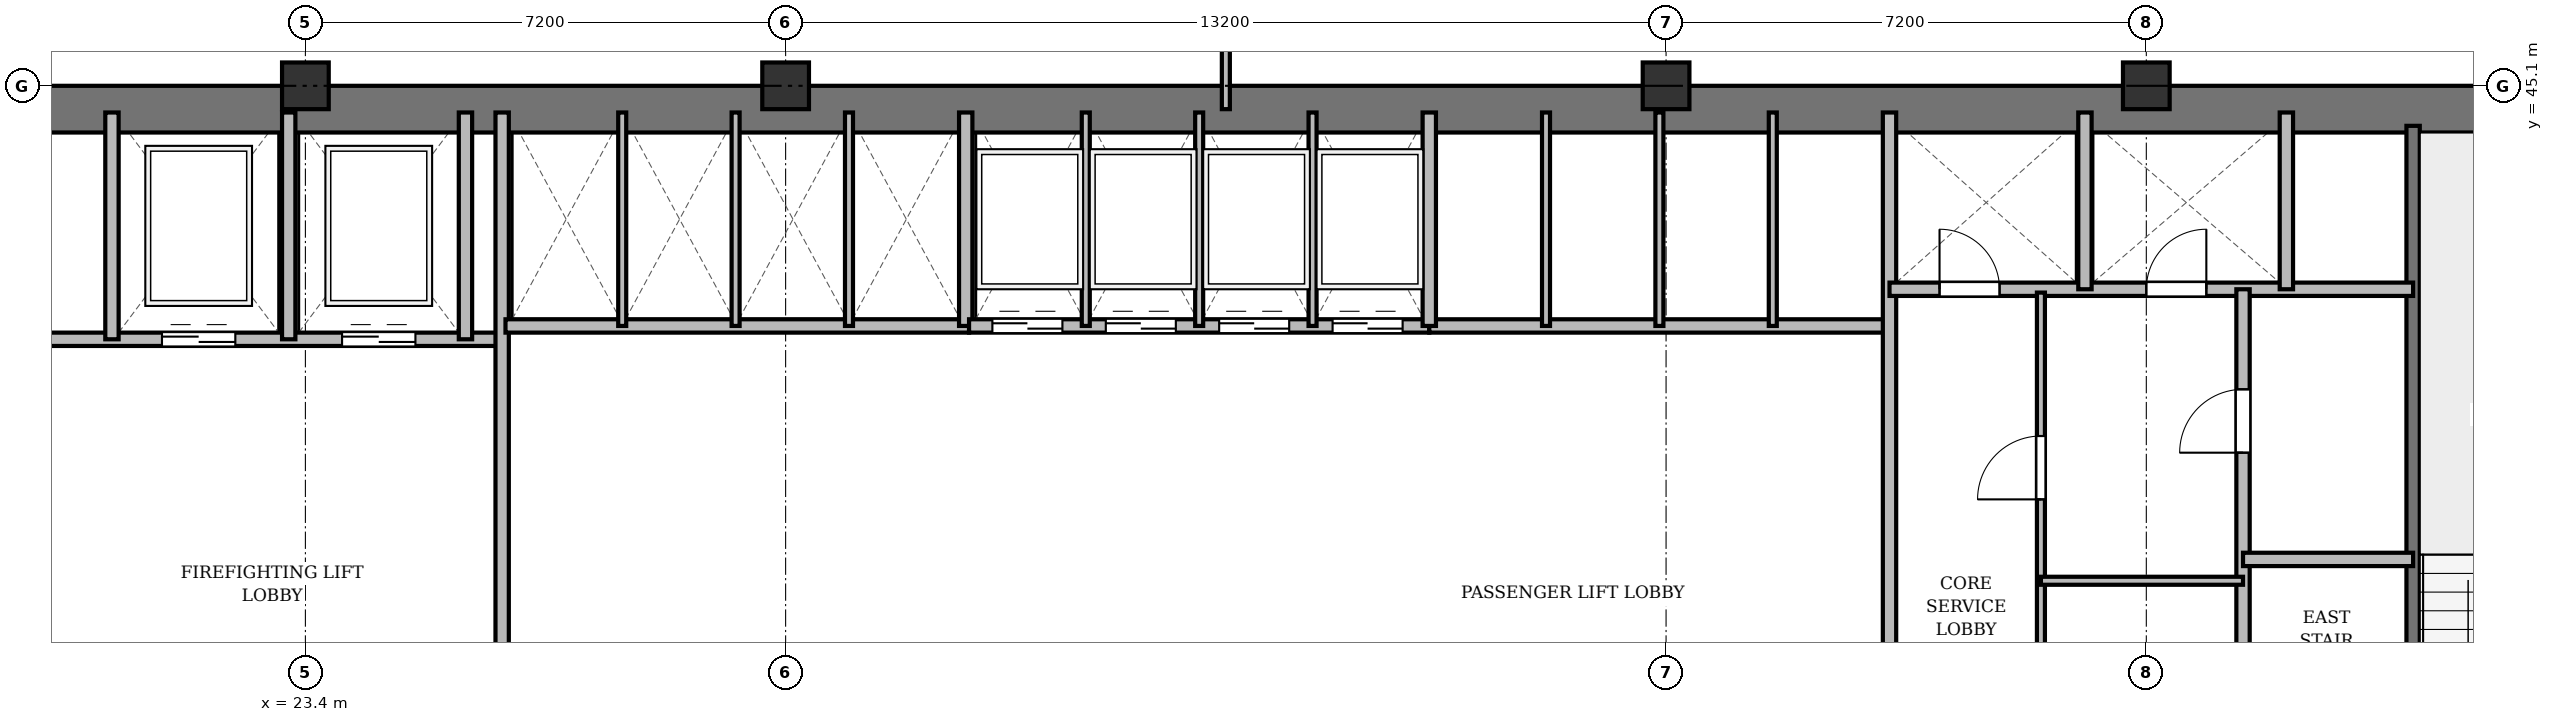
"""IFC4 building model, lengths in metres.
Left out: names, types, materials, properties, quantities, classifications, styles, units other than length and angle.
Written with IfcOpenShell. Run it as: python <this file> out.ifc"""

import sys

from ifc_helpers import new_model, si_unit, direction, frame, frame_2d, origin, origin_2d, place, context, subcontext, project, spatial, rectangle, extrude, source, transform, mapped, element, fill, save


model = new_model("IFC4")
c1 = context("Model", 3, precision=1e-05, world=origin(), true_north=direction((0.0, 1.0)))
c2 = subcontext(c1, "Body", "Model", "MODEL_VIEW")
j1 = project(units=[si_unit("LENGTHUNIT", "METRE"), si_unit("PLANEANGLEUNIT", "RADIAN")], contexts=[c1])
p1 = place(None, origin())
s1 = spatial("IfcSite", under=j1, at=p1, CompositionType="ELEMENT")
p2 = place(p1, origin())
s2 = spatial("IfcBuilding", under=s1, at=p2, CompositionType="ELEMENT")
p3 = place(p2, frame((0.0, 0.0, 132.1)))
s3 = spatial("IfcBuildingStorey", under=s2, at=p3, CompositionType="ELEMENT", Elevation=132.1)
m1 = source(origin(), c2, "Body", "SweptSolid", [
    extrude(rectangle(XDim=0.7, YDim=0.7, at=origin_2d()), origin(), (0.0, 0.0, 1.0), 3.6),
])
for number, where, z_axis, x_axis in (
    (1, (23.4, 45.1, 0.0), (0.0, 0.0, 1.0), (1.0, 0.0, 0.0)),
    (2, (30.6, 45.1, 0.0), (0.0, 0.0, 1.0), (1.0, 0.0, 0.0)),
    (3, (43.8, 45.1, 0.0), (0.0, 0.0, 1.0), (1.0, 0.0, 0.0)),
    (4, (51.0, 45.1, 0.0), (0.0, 0.0, 1.0), (1.0, 0.0, 0.0)),
):
    element("IfcColumn", number, at=place(p3, frame(where, z_axis=z_axis, x_axis=x_axis)), inside=s3, PredefinedType="COLUMN", context=c2, shape_type="MappedRepresentation", body=[
        mapped(m1, transform((0.0, 0.0, 0.0), x_axis=(1.0, 0.0, 0.0), y_axis=(0.0, 1.0, 0.0), z_axis=(0.0, 0.0, 1.0), scale=1.0)),
    ])
p4 = place(p3, frame((15.5, 44.75, 0.0), z_axis=(0.0, 0.0, 1.0), x_axis=(1.0, 0.0, 0.0)))
e5 = element("IfcWall", 5, at=p4, inside=s3, PredefinedType="SHEAR", context=c2, shape_type="SweptSolid", body=[
    extrude(rectangle(XDim=43.4, YDim=0.7, at=frame_2d((21.7, 0.0))), origin(), (0.0, 0.0, 1.0), 3.35),
])
p5 = place(p3, frame((55.0, 33.4, 0.0), z_axis=(0.0, 0.0, 1.0), x_axis=(0.0, 1.0, 0.0)))
e6 = element("IfcWall", 6, at=p5, inside=s3, PredefinedType="SHEAR", context=c2, shape_type="SweptSolid", body=[
    extrude(rectangle(XDim=11.1, YDim=0.2, at=frame_2d((5.55, 0.0))), origin(), (0.0, 0.0, 1.0), 3.35),
])
p6 = place(p5, frame((0.85, 0.0, 0.0)))
e7 = element("IfcOpeningElement", 7, at=p6, cuts=e6, PredefinedType="OPENING", context=c2, shape_type="SweptSolid", body=[
    extrude(rectangle(XDim=1.1, YDim=2.15, at=frame_2d((0.55, 1.075))), frame((0.0, 0.11, 0.0), z_axis=(0.0, -1.0, 0.0), x_axis=(1.0, 0.0, 0.0)), (0.0, 0.0, 1.0), 0.22),
])
p7 = place(p3, frame((19.55, 41.3, 0.0), z_axis=(0.0, 0.0, 1.0), x_axis=(1.0, 0.0, 0.0)))
e8 = element("IfcWall", 8, at=p7, inside=s3, PredefinedType="SOLIDWALL", context=c2, shape_type="SweptSolid", body=[
    extrude(rectangle(XDim=6.75, YDim=0.2, at=frame_2d((3.375, 0.0))), origin(), (0.0, 0.0, 1.0), 3.35),
])
p8 = place(p7, frame((1.7, 0.0, 0.0)))
e9 = element("IfcOpeningElement", 9, at=p8, cuts=e8, PredefinedType="OPENING", context=c2, shape_type="SweptSolid", body=[
    extrude(rectangle(XDim=1.1, YDim=2.15, at=frame_2d((0.55, 1.075))), frame((0.0, 0.11, 0.0), z_axis=(0.0, -1.0, 0.0), x_axis=(1.0, 0.0, 0.0)), (0.0, 0.0, 1.0), 0.22),
])
p9 = place(p7, frame((4.4, 0.0, 0.0)))
e10 = element("IfcOpeningElement", 10, at=p9, cuts=e8, PredefinedType="OPENING", context=c2, shape_type="SweptSolid", body=[
    extrude(rectangle(XDim=1.1, YDim=2.15, at=frame_2d((0.55, 1.075))), frame((0.0, 0.11, 0.0), z_axis=(0.0, -1.0, 0.0), x_axis=(1.0, 0.0, 0.0)), (0.0, 0.0, 1.0), 0.22),
])
for number, where, z_axis, x_axis in (
    (11, (20.5, 41.3, 0.0), (0.0, 0.0, 1.0), (0.0, 1.0, 0.0)),
    (12, (23.15, 41.3, 0.0), (0.0, 0.0, 1.0), (0.0, 1.0, 0.0)),
    (13, (25.8, 41.3, 0.0), (0.0, 0.0, 1.0), (0.0, 1.0, 0.0)),
):
    element("IfcWall", number, at=place(p3, frame(where, z_axis=z_axis, x_axis=x_axis)), inside=s3, PredefinedType="SOLIDWALL", context=c2, shape_type="SweptSolid", body=[
        extrude(rectangle(XDim=3.4, YDim=0.2, at=frame_2d((1.7, 0.0))), origin(), (0.0, 0.0, 1.0), 3.35),
    ])
p10 = place(p3, frame((26.35, 33.4, 0.0), z_axis=(0.0, 0.0, 1.0), x_axis=(0.0, 1.0, 0.0)))
e14 = element("IfcWall", 14, at=p10, inside=s3, PredefinedType="SOLIDWALL", context=c2, shape_type="SweptSolid", body=[
    extrude(rectangle(XDim=11.3, YDim=0.2, at=frame_2d((5.65, 0.0))), origin(), (0.0, 0.0, 1.0), 2.75),
])
p11 = place(p3, frame((26.4, 41.5, 0.0), z_axis=(0.0, 0.0, 1.0), x_axis=(1.0, 0.0, 0.0)))
e15 = element("IfcWall", 15, at=p11, inside=s3, PredefinedType="SOLIDWALL", context=c2, shape_type="SweptSolid", body=[
    extrude(rectangle(XDim=6.95, YDim=0.2, at=frame_2d((3.475, 0.0))), origin(), (0.0, 0.0, 1.0), 2.85),
])
p12 = place(p3, frame((33.3, 41.5, 0.0), z_axis=(0.0, 0.0, 1.0), x_axis=(0.0, 1.0, 0.0)))
e16 = element("IfcWall", 16, at=p12, inside=s3, PredefinedType="SOLIDWALL", context=c2, shape_type="SweptSolid", body=[
    extrude(rectangle(XDim=3.2, YDim=0.2, at=frame_2d((1.6, 0.0))), origin(), (0.0, 0.0, 1.0), 3.35),
])
for number, where, z_axis, x_axis in (
    (17, (28.15, 41.5, 0.0), (0.0, 0.0, 1.0), (0.0, 1.0, 0.0)),
    (18, (29.85, 41.5, 0.0), (0.0, 0.0, 1.0), (0.0, 1.0, 0.0)),
    (19, (31.55, 41.5, 0.0), (0.0, 0.0, 1.0), (0.0, 1.0, 0.0)),
):
    element("IfcWall", number, at=place(p3, frame(where, z_axis=z_axis, x_axis=x_axis)), inside=s3, PredefinedType="PARTITIONING", context=c2, shape_type="SweptSolid", body=[
        extrude(rectangle(XDim=3.2, YDim=0.12, at=frame_2d((1.6, 0.0))), origin(), (0.0, 0.0, 1.0), 3.35),
    ])
p13 = place(p3, frame((33.35, 41.5, 0.0), z_axis=(0.0, 0.0, 1.0), x_axis=(1.0, 0.0, 0.0)))
e20 = element("IfcWall", 20, at=p13, inside=s3, PredefinedType="SOLIDWALL", context=c2, shape_type="SweptSolid", body=[
    extrude(rectangle(XDim=6.9, YDim=0.2, at=frame_2d((3.45, 0.0))), origin(), (0.0, 0.0, 1.0), 3.35),
])
p14 = place(p13, frame((0.35, 0.0, 0.0)))
e21 = element("IfcOpeningElement", 21, at=p14, cuts=e20, PredefinedType="OPENING", context=c2, shape_type="SweptSolid", body=[
    extrude(rectangle(XDim=1.05, YDim=2.15, at=frame_2d((0.525, 1.075))), frame((0.0, 0.11, 0.0), z_axis=(0.0, -1.0, 0.0), x_axis=(1.0, 0.0, 0.0)), (0.0, 0.0, 1.0), 0.22),
])
p15 = place(p13, frame((2.05, 0.0, 0.0)))
e22 = element("IfcOpeningElement", 22, at=p15, cuts=e20, PredefinedType="OPENING", context=c2, shape_type="SweptSolid", body=[
    extrude(rectangle(XDim=1.05, YDim=2.15, at=frame_2d((0.525, 1.075))), frame((0.0, 0.11, 0.0), z_axis=(0.0, -1.0, 0.0), x_axis=(1.0, 0.0, 0.0)), (0.0, 0.0, 1.0), 0.22),
])
p16 = place(p13, frame((3.75, 0.0, 0.0)))
e23 = element("IfcOpeningElement", 23, at=p16, cuts=e20, PredefinedType="OPENING", context=c2, shape_type="SweptSolid", body=[
    extrude(rectangle(XDim=1.05, YDim=2.15, at=frame_2d((0.525, 1.075))), frame((0.0, 0.11, 0.0), z_axis=(0.0, -1.0, 0.0), x_axis=(1.0, 0.0, 0.0)), (0.0, 0.0, 1.0), 0.22),
])
p17 = place(p13, frame((5.45, 0.0, 0.0)))
e24 = element("IfcOpeningElement", 24, at=p17, cuts=e20, PredefinedType="OPENING", context=c2, shape_type="SweptSolid", body=[
    extrude(rectangle(XDim=1.05, YDim=2.15, at=frame_2d((0.525, 1.075))), frame((0.0, 0.11, 0.0), z_axis=(0.0, -1.0, 0.0), x_axis=(1.0, 0.0, 0.0)), (0.0, 0.0, 1.0), 0.22),
])
for number, where, z_axis, x_axis in (
    (25, (35.1, 41.5, 0.0), (0.0, 0.0, 1.0), (0.0, 1.0, 0.0)),
    (26, (36.8, 41.5, 0.0), (0.0, 0.0, 1.0), (0.0, 1.0, 0.0)),
    (27, (38.5, 41.5, 0.0), (0.0, 0.0, 1.0), (0.0, 1.0, 0.0)),
):
    element("IfcWall", number, at=place(p3, frame(where, z_axis=z_axis, x_axis=x_axis)), inside=s3, PredefinedType="PARTITIONING", context=c2, shape_type="SweptSolid", body=[
        extrude(rectangle(XDim=3.2, YDim=0.12, at=frame_2d((1.6, 0.0))), origin(), (0.0, 0.0, 1.0), 3.35),
    ])
p18 = place(p3, frame((40.25, 41.5, 0.0), z_axis=(0.0, 0.0, 1.0), x_axis=(1.0, 0.0, 0.0)))
e28 = element("IfcWall", 28, at=p18, inside=s3, PredefinedType="SOLIDWALL", context=c2, shape_type="SweptSolid", body=[
    extrude(rectangle(XDim=6.9, YDim=0.2, at=frame_2d((3.45, 0.0))), origin(), (0.0, 0.0, 1.0), 2.85),
])
p19 = place(p3, frame((40.25, 41.5, 0.0), z_axis=(0.0, 0.0, 1.0), x_axis=(0.0, 1.0, 0.0)))
e29 = element("IfcWall", 29, at=p19, inside=s3, PredefinedType="SOLIDWALL", context=c2, shape_type="SweptSolid", body=[
    extrude(rectangle(XDim=3.2, YDim=0.2, at=frame_2d((1.6, 0.0))), origin(), (0.0, 0.0, 1.0), 3.35),
])
p20 = place(p3, frame((42.0, 41.5, 0.0), z_axis=(0.0, 0.0, 1.0), x_axis=(0.0, 1.0, 0.0)))
e30 = element("IfcWall", 30, at=p20, inside=s3, PredefinedType="PARTITIONING", context=c2, shape_type="SweptSolid", body=[
    extrude(rectangle(XDim=3.2, YDim=0.12, at=frame_2d((1.6, 0.0))), origin(), (0.0, 0.0, 1.0), 3.35),
])
p21 = place(p3, frame((43.7, 41.5, 0.0), z_axis=(0.0, 0.0, 1.0), x_axis=(0.0, 1.0, 0.0)))
e31 = element("IfcWall", 31, at=p21, inside=s3, PredefinedType="PARTITIONING", context=c2, shape_type="SweptSolid", body=[
    extrude(rectangle(XDim=3.2, YDim=0.12, at=frame_2d((1.6, 0.0))), origin(), (0.0, 0.0, 1.0), 2.85),
])
p22 = place(p3, frame((45.4, 41.5, 0.0), z_axis=(0.0, 0.0, 1.0), x_axis=(0.0, 1.0, 0.0)))
e32 = element("IfcWall", 32, at=p22, inside=s3, PredefinedType="PARTITIONING", context=c2, shape_type="SweptSolid", body=[
    extrude(rectangle(XDim=3.2, YDim=0.12, at=frame_2d((1.6, 0.0))), origin(), (0.0, 0.0, 1.0), 3.35),
])
p23 = place(p3, frame((47.15, 33.4, 0.0), z_axis=(0.0, 0.0, 1.0), x_axis=(0.0, 1.0, 0.0)))
e33 = element("IfcWall", 33, at=p23, inside=s3, PredefinedType="SOLIDWALL", context=c2, shape_type="SweptSolid", body=[
    extrude(rectangle(XDim=11.3, YDim=0.2, at=frame_2d((5.65, 0.0))), origin(), (0.0, 0.0, 1.0), 2.75),
])
p24 = place(p3, frame((47.15, 42.05, 0.0), z_axis=(0.0, 0.0, 1.0), x_axis=(1.0, 0.0, 0.0)))
e34 = element("IfcWall", 34, at=p24, inside=s3, PredefinedType="SOLIDWALL", context=c2, shape_type="SweptSolid", body=[
    extrude(rectangle(XDim=7.85, YDim=0.2, at=frame_2d((3.925, 0.0))), origin(), (0.0, 0.0, 1.0), 2.85),
])
p25 = place(p24, frame((0.75, 0.0, 0.0)))
e35 = element("IfcOpeningElement", 35, at=p25, cuts=e34, PredefinedType="OPENING", context=c2, shape_type="SweptSolid", body=[
    extrude(rectangle(XDim=0.9, YDim=2.1, at=frame_2d((0.45, 1.05))), frame((0.0, 0.11, 0.0), z_axis=(0.0, -1.0, 0.0), x_axis=(1.0, 0.0, 0.0)), (0.0, 0.0, 1.0), 0.22),
])
p26 = place(p24, frame((3.85, 0.0, 0.0)))
e36 = element("IfcOpeningElement", 36, at=p26, cuts=e34, PredefinedType="OPENING", context=c2, shape_type="SweptSolid", body=[
    extrude(rectangle(XDim=0.9, YDim=2.1, at=frame_2d((0.45, 1.05))), frame((0.0, 0.11, 0.0), z_axis=(0.0, -1.0, 0.0), x_axis=(1.0, 0.0, 0.0)), (0.0, 0.0, 1.0), 0.22),
])
for number, where, z_axis, x_axis in (
    (37, (50.08, 42.05, 0.0), (0.0, 0.0, 1.0), (0.0, 1.0, 0.0)),
    (38, (53.1, 42.05, 0.0), (0.0, 0.0, 1.0), (0.0, 1.0, 0.0)),
):
    element("IfcWall", number, at=place(p3, frame(where, z_axis=z_axis, x_axis=x_axis)), inside=s3, PredefinedType="SOLIDWALL", context=c2, shape_type="SweptSolid", body=[
        extrude(rectangle(XDim=2.65, YDim=0.2, at=frame_2d((1.325, 0.0))), origin(), (0.0, 0.0, 1.0), 3.35),
    ])
p27 = place(p3, frame((52.45, 33.4, 0.0), z_axis=(0.0, 0.0, 1.0), x_axis=(0.0, 1.0, 0.0)))
e39 = element("IfcWall", 39, at=p27, inside=s3, PredefinedType="PARTITIONING", context=c2, shape_type="SweptSolid", body=[
    extrude(rectangle(XDim=8.65, YDim=0.2, at=frame_2d((4.325, 0.0))), origin(), (0.0, 0.0, 1.0), 2.75),
])
p28 = place(p27, frame((6.2, 0.0, 0.0)))
e40 = element("IfcOpeningElement", 40, at=p28, cuts=e39, PredefinedType="OPENING", context=c2, shape_type="SweptSolid", body=[
    extrude(rectangle(XDim=0.95, YDim=2.15, at=frame_2d((0.475, 1.075))), frame((0.0, 0.11, 0.0), z_axis=(0.0, -1.0, 0.0), x_axis=(1.0, 0.0, 0.0)), (0.0, 0.0, 1.0), 0.22),
])
p29 = place(p3, frame((52.45, 38.0, 0.0), z_axis=(0.0, 0.0, 1.0), x_axis=(1.0, 0.0, 0.0)))
e41 = element("IfcWall", 41, at=p29, inside=s3, PredefinedType="PARTITIONING", context=c2, shape_type="SweptSolid", body=[
    extrude(rectangle(XDim=2.55, YDim=0.2, at=frame_2d((1.275, 0.0))), origin(), (0.0, 0.0, 1.0), 3.35),
])
p30 = place(p3, frame((49.42, 33.4, 0.0), z_axis=(0.0, 0.0, 1.0), x_axis=(0.0, 1.0, 0.0)))
e42 = element("IfcWall", 42, at=p30, inside=s3, PredefinedType="PARTITIONING", context=c2, shape_type="SweptSolid", body=[
    extrude(rectangle(XDim=8.6, YDim=0.12, at=frame_2d((4.3, 0.0))), origin(), (0.0, 0.0, 1.0), 2.75),
])
p31 = place(p30, frame((1.3, 0.0, 0.0)))
e43 = element("IfcOpeningElement", 43, at=p31, cuts=e42, PredefinedType="OPENING", context=c2, shape_type="SweptSolid", body=[
    extrude(rectangle(XDim=0.95, YDim=2.15, at=frame_2d((0.475, 1.075))), frame((0.0, 0.07, 0.0), z_axis=(0.0, -1.0, 0.0), x_axis=(1.0, 0.0, 0.0)), (0.0, 0.0, 1.0), 0.14),
])
p32 = place(p30, frame((5.5, 0.0, 0.0)))
e44 = element("IfcOpeningElement", 44, at=p32, cuts=e42, PredefinedType="OPENING", context=c2, shape_type="SweptSolid", body=[
    extrude(rectangle(XDim=0.95, YDim=2.15, at=frame_2d((0.475, 1.075))), frame((0.0, 0.07, 0.0), z_axis=(0.0, -1.0, 0.0), x_axis=(1.0, 0.0, 0.0)), (0.0, 0.0, 1.0), 0.14),
])
p33 = place(p3, frame((49.42, 37.68, 0.0), z_axis=(0.0, 0.0, 1.0), x_axis=(1.0, 0.0, 0.0)))
e45 = element("IfcWall", 45, at=p33, inside=s3, PredefinedType="PARTITIONING", context=c2, shape_type="SweptSolid", body=[
    extrude(rectangle(XDim=3.03, YDim=0.12, at=frame_2d((1.515, 0.0))), origin(), (0.0, 0.0, 1.0), 2.85),
])
p34 = place(p3, frame((37.2, 44.75, 0.0), z_axis=(0.0, 0.0, 1.0), x_axis=(0.0, 1.0, 0.0)))
e46 = element("IfcWall", 46, at=p34, inside=s3, PredefinedType="PARTITIONING", context=c2, shape_type="SweptSolid", body=[
    extrude(rectangle(XDim=3.61, YDim=0.12, at=frame_2d((1.805, 0.0))), origin(), (0.0, 0.0, 1.0), 2.75),
])
p35 = place(p34, frame((1.1, 0.0, 0.0)))
e47 = element("IfcOpeningElement", 47, at=p35, cuts=e46, PredefinedType="OPENING", context=c2, shape_type="SweptSolid", body=[
    extrude(rectangle(XDim=0.95, YDim=2.15, at=frame_2d((0.475, 1.075))), frame((0.0, 0.07, 0.0), z_axis=(0.0, -1.0, 0.0), x_axis=(1.0, 0.0, 0.0)), (0.0, 0.0, 1.0), 0.14),
])
m2 = source(origin(), c2, "Body", "SweptSolid", [
    extrude(rectangle(XDim=1.1, YDim=2.15, at=frame_2d((0.55, 1.075))), frame((0.0, 0.025, 0.0), z_axis=(0.0, -1.0, 0.0), x_axis=(1.0, 0.0, 0.0)), (0.0, 0.0, 1.0), 0.05),
])
p36 = place(p8, origin())
e48 = element("IfcDoor", 48, at=p36, inside=s3, OperationType="DOUBLE_DOOR_SLIDING", PredefinedType="DOOR", context=c2, shape_type="MappedRepresentation", body=[
    mapped(m2, transform((0.0, 0.0, 0.0), x_axis=(1.0, 0.0, 0.0), y_axis=(0.0, 1.0, 0.0), z_axis=(0.0, 0.0, 1.0), scale=1.0)),
])
fill(e9, e48)
p37 = place(p9, origin())
e49 = element("IfcDoor", 49, at=p37, inside=s3, OperationType="DOUBLE_DOOR_SLIDING", PredefinedType="DOOR", context=c2, shape_type="MappedRepresentation", body=[
    mapped(m2, transform((0.0, 0.0, 0.0), x_axis=(1.0, 0.0, 0.0), y_axis=(0.0, 1.0, 0.0), z_axis=(0.0, 0.0, 1.0), scale=1.0)),
])
fill(e10, e49)
m3 = source(origin(), c2, "Body", "SweptSolid", [
    extrude(rectangle(XDim=1.05, YDim=2.15, at=frame_2d((0.525, 1.075))), frame((0.0, 0.025, 0.0), z_axis=(0.0, -1.0, 0.0), x_axis=(1.0, 0.0, 0.0)), (0.0, 0.0, 1.0), 0.05),
])
p38 = place(p14, origin())
e50 = element("IfcDoor", 50, at=p38, inside=s3, OperationType="DOUBLE_DOOR_SLIDING", PredefinedType="DOOR", context=c2, shape_type="MappedRepresentation", body=[
    mapped(m3, transform((0.0, 0.0, 0.0), x_axis=(1.0, 0.0, 0.0), y_axis=(0.0, 1.0, 0.0), z_axis=(0.0, 0.0, 1.0), scale=1.0)),
])
fill(e21, e50)
p39 = place(p15, origin())
e51 = element("IfcDoor", 51, at=p39, inside=s3, OperationType="DOUBLE_DOOR_SLIDING", PredefinedType="DOOR", context=c2, shape_type="MappedRepresentation", body=[
    mapped(m3, transform((0.0, 0.0, 0.0), x_axis=(1.0, 0.0, 0.0), y_axis=(0.0, 1.0, 0.0), z_axis=(0.0, 0.0, 1.0), scale=1.0)),
])
fill(e22, e51)
p40 = place(p16, origin())
e52 = element("IfcDoor", 52, at=p40, inside=s3, OperationType="DOUBLE_DOOR_SLIDING", PredefinedType="DOOR", context=c2, shape_type="MappedRepresentation", body=[
    mapped(m3, transform((0.0, 0.0, 0.0), x_axis=(1.0, 0.0, 0.0), y_axis=(0.0, 1.0, 0.0), z_axis=(0.0, 0.0, 1.0), scale=1.0)),
])
fill(e23, e52)
p41 = place(p17, origin())
e53 = element("IfcDoor", 53, at=p41, inside=s3, OperationType="DOUBLE_DOOR_SLIDING", PredefinedType="DOOR", context=c2, shape_type="MappedRepresentation", body=[
    mapped(m3, transform((0.0, 0.0, 0.0), x_axis=(1.0, 0.0, 0.0), y_axis=(0.0, 1.0, 0.0), z_axis=(0.0, 0.0, 1.0), scale=1.0)),
])
fill(e24, e53)
m4 = source(origin(), c2, "Body", "SweptSolid", [
    extrude(rectangle(XDim=0.9, YDim=2.1, at=frame_2d((0.45, 1.05))), frame((0.0, 0.025, 0.0), z_axis=(0.0, -1.0, 0.0), x_axis=(1.0, 0.0, 0.0)), (0.0, 0.0, 1.0), 0.05),
])
p42 = place(p25, origin())
e54 = element("IfcDoor", 54, at=p42, inside=s3, OperationType="SINGLE_SWING_LEFT", PredefinedType="DOOR", context=c2, shape_type="MappedRepresentation", body=[
    mapped(m4, transform((0.0, 0.0, 0.0), x_axis=(1.0, 0.0, 0.0), y_axis=(0.0, 1.0, 0.0), z_axis=(0.0, 0.0, 1.0), scale=1.0)),
])
fill(e35, e54)
p43 = place(p26, origin())
e55 = element("IfcDoor", 55, at=p43, inside=s3, OperationType="SINGLE_SWING_RIGHT", PredefinedType="DOOR", context=c2, shape_type="MappedRepresentation", body=[
    mapped(m4, transform((0.0, 0.0, 0.0), x_axis=(1.0, 0.0, 0.0), y_axis=(0.0, 1.0, 0.0), z_axis=(0.0, 0.0, 1.0), scale=1.0)),
])
fill(e36, e55)
m5 = source(origin(), c2, "Body", "SweptSolid", [
    extrude(rectangle(XDim=0.95, YDim=2.15, at=frame_2d((0.475, 1.075))), frame((0.0, 0.025, 0.0), z_axis=(0.0, -1.0, 0.0), x_axis=(1.0, 0.0, 0.0)), (0.0, 0.0, 1.0), 0.05),
])
p44 = place(p28, origin())
e56 = element("IfcDoor", 56, at=p44, inside=s3, OperationType="SINGLE_SWING_LEFT", PredefinedType="DOOR", context=c2, shape_type="MappedRepresentation", body=[
    mapped(m5, transform((0.0, 0.0, 0.0), x_axis=(1.0, 0.0, 0.0), y_axis=(0.0, 1.0, 0.0), z_axis=(0.0, 0.0, 1.0), scale=1.0)),
])
fill(e40, e56)
p45 = place(p32, origin())
e57 = element("IfcDoor", 57, at=p45, inside=s3, OperationType="SINGLE_SWING_LEFT", PredefinedType="DOOR", context=c2, shape_type="MappedRepresentation", body=[
    mapped(m5, transform((0.0, 0.0, 0.0), x_axis=(1.0, 0.0, 0.0), y_axis=(0.0, 1.0, 0.0), z_axis=(0.0, 0.0, 1.0), scale=1.0)),
])
fill(e44, e57)
save(model, sys.argv[1])
